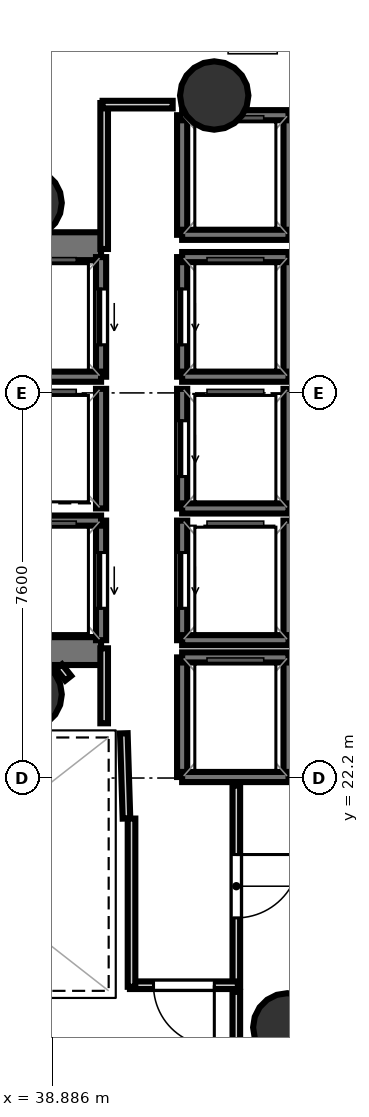
"""IFC4 building model, lengths in metres.
Left out: names, types, materials, properties, quantities, classifications, styles, units other than length and angle.
Written with IfcOpenShell. Run it as: python <this file> out.ifc"""

import sys

from ifc_helpers import new_model, si_unit, direction, frame, frame_2d, origin, origin_2d, place, context, subcontext, project, spatial, rectangle, hollow_circle, extrude, element, fill, save


model = new_model("IFC4")
c1 = context("Model", 3, precision=1e-05, world=origin(), true_north=direction((0.0, 1.0)))
c2 = subcontext(c1, "Body", "Model", "MODEL_VIEW")
j1 = project(units=[si_unit("LENGTHUNIT", "METRE"), si_unit("PLANEANGLEUNIT", "RADIAN")], contexts=[c1])
p1 = place(None, origin())
s1 = spatial("IfcSite", under=j1, at=p1, CompositionType="ELEMENT")
p2 = place(p1, origin())
s2 = spatial("IfcBuilding", under=s1, at=p2, CompositionType="ELEMENT")
p3 = place(p2, frame((0.0, 0.0, 158.7)))
s3 = spatial("IfcBuildingStorey", under=s2, at=p3, CompositionType="ELEMENT", Elevation=158.7)
p4 = place(p3, frame((29.23, 32.695, 0.0), z_axis=(0.0, 0.0, 1.0), x_axis=(1.0, 0.0, 0.0)))
e1 = element("IfcWall", 1, at=p4, inside=s3, PredefinedType="SHEAR", context=c2, shape_type="SweptSolid", body=[
    extrude(rectangle(XDim=10.62, YDim=0.55, at=frame_2d((5.31, 0.0))), origin(), (0.0, 0.0, 1.0), 3.52),
])
p5 = place(p4, frame((0.995, 0.0, 0.0)))
e2 = element("IfcOpeningElement", 2, at=p5, cuts=e1, PredefinedType="OPENING", context=c2, shape_type="SweptSolid", body=[
    extrude(rectangle(XDim=1.25, YDim=2.15, at=frame_2d((0.625, 1.075))), frame((0.0, 0.285, 0.0), z_axis=(0.0, -1.0, 0.0), x_axis=(1.0, 0.0, 0.0)), (0.0, 0.0, 1.0), 0.57),
])
p6 = place(p3, frame((29.23, 24.705, 0.0), z_axis=(0.0, 0.0, 1.0), x_axis=(1.0, 0.0, 0.0)))
e3 = element("IfcWall", 3, at=p6, inside=s3, PredefinedType="SHEAR", context=c2, shape_type="SweptSolid", body=[
    extrude(rectangle(XDim=10.62, YDim=0.55, at=frame_2d((5.31, 0.0))), origin(), (0.0, 0.0, 1.0), 3.52),
])
p7 = place(p6, frame((0.795, 0.0, 0.0)))
e4 = element("IfcOpeningElement", 4, at=p7, cuts=e3, PredefinedType="OPENING", context=c2, shape_type="SweptSolid", body=[
    extrude(rectangle(XDim=1.25, YDim=2.15, at=frame_2d((0.625, 1.075))), frame((0.0, 0.285, 0.0), z_axis=(0.0, -1.0, 0.0), x_axis=(1.0, 0.0, 0.0)), (0.0, 0.0, 1.0), 0.57),
])
for number, where, z_axis, x_axis in (
    (5, (38.4, 33.55, 0.0), (0.0, 0.0, 1.0), (1.0, 0.0, 0.0)),
    (6, (38.4, 23.85, 0.0), (0.0, 0.0, 1.0), (1.0, 0.0, 0.0)),
    (7, (42.083, 35.669, 0.0), (0.0, 0.0, 1.0), (1.0, 0.0, 0.0)),
    (8, (43.525, 17.279, 0.0), (0.0, 0.0, 1.0), (1.0, 0.0, 0.0)),
):
    element("IfcColumn", number, at=place(p3, frame(where, z_axis=z_axis, x_axis=x_axis)), inside=s3, PredefinedType="COLUMN", context=c2, shape_type="SweptSolid", body=[
        extrude(hollow_circle(Radius=0.675, WallThickness=0.032, at=origin_2d()), origin(), (0.0, 0.0, 1.0), 3.7),
    ])
p8 = place(p3, frame((39.85, 30.12, 0.0), z_axis=(0.0, 0.0, 1.0), x_axis=(0.0, 1.0, 0.0)))
e9 = element("IfcWall", 9, at=p8, inside=s3, PredefinedType="SOLIDWALL", context=c2, shape_type="SweptSolid", body=[
    extrude(rectangle(XDim=2.36, YDim=0.2, at=frame_2d((1.18, 0.0))), origin(), (0.0, 0.0, 1.0), 3.52),
])
p9 = place(p8, frame((0.63, 0.0, 0.0)))
e10 = element("IfcOpeningElement", 10, at=p9, cuts=e9, PredefinedType="OPENING", context=c2, shape_type="SweptSolid", body=[
    extrude(rectangle(XDim=1.1, YDim=2.15, at=frame_2d((0.55, 1.075))), frame((0.0, 0.11, 0.0), z_axis=(0.0, -1.0, 0.0), x_axis=(1.0, 0.0, 0.0)), (0.0, 0.0, 1.0), 0.22),
])
p10 = place(p3, frame((37.75, 30.12, 0.0), z_axis=(0.0, 0.0, 1.0), x_axis=(1.0, 0.0, 0.0)))
e11 = element("IfcWall", 11, at=p10, inside=s3, PredefinedType="SOLIDWALL", context=c2, shape_type="SweptSolid", body=[
    extrude(rectangle(XDim=2.1, YDim=0.2, at=frame_2d((1.05, 0.0))), origin(), (0.0, 0.0, 1.0), 3.52),
])
p11 = place(p3, frame((39.85, 24.92, 0.0), z_axis=(0.0, 0.0, 1.0), x_axis=(0.0, 1.0, 0.0)))
e12 = element("IfcWall", 12, at=p11, inside=s3, PredefinedType="SOLIDWALL", context=c2, shape_type="SweptSolid", body=[
    extrude(rectangle(XDim=2.36, YDim=0.2, at=frame_2d((1.18, 0.0))), origin(), (0.0, 0.0, 1.0), 3.52),
])
p12 = place(p11, frame((0.63, 0.0, 0.0)))
e13 = element("IfcOpeningElement", 13, at=p12, cuts=e12, PredefinedType="OPENING", context=c2, shape_type="SweptSolid", body=[
    extrude(rectangle(XDim=1.1, YDim=2.15, at=frame_2d((0.55, 1.075))), frame((0.0, 0.11, 0.0), z_axis=(0.0, -1.0, 0.0), x_axis=(1.0, 0.0, 0.0)), (0.0, 0.0, 1.0), 0.22),
])
p13 = place(p3, frame((37.75, 27.28, 0.0), z_axis=(0.0, 0.0, 1.0), x_axis=(1.0, 0.0, 0.0)))
e14 = element("IfcWall", 14, at=p13, inside=s3, PredefinedType="SOLIDWALL", context=c2, shape_type="SweptSolid", body=[
    extrude(rectangle(XDim=2.1, YDim=0.2, at=frame_2d((1.05, 0.0))), origin(), (0.0, 0.0, 1.0), 3.52),
])
p14 = place(p3, frame((43.55, 30.12, 0.0), z_axis=(0.0, 0.0, 1.0), x_axis=(0.0, 1.0, 0.0)))
e15 = element("IfcWall", 15, at=p14, inside=s3, PredefinedType="SOLIDWALL", context=c2, shape_type="SweptSolid", body=[
    extrude(rectangle(XDim=2.36, YDim=0.2, at=frame_2d((1.18, 0.0))), origin(), (0.0, 0.0, 1.0), 3.52),
])
p15 = place(p3, frame((41.45, 30.12, 0.0), z_axis=(0.0, 0.0, 1.0), x_axis=(0.0, 1.0, 0.0)))
e16 = element("IfcWall", 16, at=p15, inside=s3, PredefinedType="SOLIDWALL", context=c2, shape_type="SweptSolid", body=[
    extrude(rectangle(XDim=2.36, YDim=0.2, at=frame_2d((1.18, 0.0))), origin(), (0.0, 0.0, 1.0), 3.52),
])
p16 = place(p15, frame((0.63, 0.0, 0.0)))
e17 = element("IfcOpeningElement", 17, at=p16, cuts=e16, PredefinedType="OPENING", context=c2, shape_type="SweptSolid", body=[
    extrude(rectangle(XDim=1.1, YDim=2.15, at=frame_2d((0.55, 1.075))), frame((0.0, 0.11, 0.0), z_axis=(0.0, -1.0, 0.0), x_axis=(1.0, 0.0, 0.0)), (0.0, 0.0, 1.0), 0.22),
])
for number, where, z_axis, x_axis in (
    (18, (41.45, 32.48, 0.0), (0.0, 0.0, 1.0), (1.0, 0.0, 0.0)),
    (19, (41.45, 30.12, 0.0), (0.0, 0.0, 1.0), (1.0, 0.0, 0.0)),
):
    element("IfcWall", number, at=place(p3, frame(where, z_axis=z_axis, x_axis=x_axis)), inside=s3, PredefinedType="SOLIDWALL", context=c2, shape_type="SweptSolid", body=[
        extrude(rectangle(XDim=2.1, YDim=0.2, at=frame_2d((1.05, 0.0))), origin(), (0.0, 0.0, 1.0), 3.52),
    ])
p17 = place(p3, frame((43.55, 27.52, 0.0), z_axis=(0.0, 0.0, 1.0), x_axis=(0.0, 1.0, 0.0)))
e20 = element("IfcWall", 20, at=p17, inside=s3, PredefinedType="SOLIDWALL", context=c2, shape_type="SweptSolid", body=[
    extrude(rectangle(XDim=2.36, YDim=0.2, at=frame_2d((1.18, 0.0))), origin(), (0.0, 0.0, 1.0), 3.52),
])
p18 = place(p3, frame((41.45, 27.52, 0.0), z_axis=(0.0, 0.0, 1.0), x_axis=(0.0, 1.0, 0.0)))
e21 = element("IfcWall", 21, at=p18, inside=s3, PredefinedType="SOLIDWALL", context=c2, shape_type="SweptSolid", body=[
    extrude(rectangle(XDim=2.36, YDim=0.2, at=frame_2d((1.18, 0.0))), origin(), (0.0, 0.0, 1.0), 3.52),
])
p19 = place(p18, frame((0.63, 0.0, 0.0)))
e22 = element("IfcOpeningElement", 22, at=p19, cuts=e21, PredefinedType="OPENING", context=c2, shape_type="SweptSolid", body=[
    extrude(rectangle(XDim=1.1, YDim=2.15, at=frame_2d((0.55, 1.075))), frame((0.0, 0.11, 0.0), z_axis=(0.0, -1.0, 0.0), x_axis=(1.0, 0.0, 0.0)), (0.0, 0.0, 1.0), 0.22),
])
p20 = place(p3, frame((41.45, 27.52, 0.0), z_axis=(0.0, 0.0, 1.0), x_axis=(1.0, 0.0, 0.0)))
e23 = element("IfcWall", 23, at=p20, inside=s3, PredefinedType="SOLIDWALL", context=c2, shape_type="SweptSolid", body=[
    extrude(rectangle(XDim=2.1, YDim=0.2, at=frame_2d((1.05, 0.0))), origin(), (0.0, 0.0, 1.0), 3.52),
])
p21 = place(p3, frame((43.55, 24.92, 0.0), z_axis=(0.0, 0.0, 1.0), x_axis=(0.0, 1.0, 0.0)))
e24 = element("IfcWall", 24, at=p21, inside=s3, PredefinedType="SOLIDWALL", context=c2, shape_type="SweptSolid", body=[
    extrude(rectangle(XDim=2.36, YDim=0.2, at=frame_2d((1.18, 0.0))), origin(), (0.0, 0.0, 1.0), 3.52),
])
p22 = place(p3, frame((41.45, 24.92, 0.0), z_axis=(0.0, 0.0, 1.0), x_axis=(0.0, 1.0, 0.0)))
e25 = element("IfcWall", 25, at=p22, inside=s3, PredefinedType="SOLIDWALL", context=c2, shape_type="SweptSolid", body=[
    extrude(rectangle(XDim=2.36, YDim=0.2, at=frame_2d((1.18, 0.0))), origin(), (0.0, 0.0, 1.0), 3.52),
])
p23 = place(p22, frame((0.63, 0.0, 0.0)))
e26 = element("IfcOpeningElement", 26, at=p23, cuts=e25, PredefinedType="OPENING", context=c2, shape_type="SweptSolid", body=[
    extrude(rectangle(XDim=1.1, YDim=2.15, at=frame_2d((0.55, 1.075))), frame((0.0, 0.11, 0.0), z_axis=(0.0, -1.0, 0.0), x_axis=(1.0, 0.0, 0.0)), (0.0, 0.0, 1.0), 0.22),
])
p24 = place(p3, frame((41.45, 24.92, 0.0), z_axis=(0.0, 0.0, 1.0), x_axis=(1.0, 0.0, 0.0)))
e27 = element("IfcWall", 27, at=p24, inside=s3, PredefinedType="SOLIDWALL", context=c2, shape_type="SweptSolid", body=[
    extrude(rectangle(XDim=2.1, YDim=0.2, at=frame_2d((1.05, 0.0))), origin(), (0.0, 0.0, 1.0), 3.52),
])
p25 = place(p3, frame((39.85, 27.52, 0.0), z_axis=(0.0, 0.0, 1.0), x_axis=(0.0, 1.0, 0.0)))
e28 = element("IfcWall", 28, at=p25, inside=s3, PredefinedType="SOLIDWALL", context=c2, shape_type="SweptSolid", body=[
    extrude(rectangle(XDim=2.36, YDim=0.2, at=frame_2d((1.18, 0.0))), origin(), (0.0, 0.0, 1.0), 3.52),
])
for number, where, z_axis, x_axis in (
    (29, (43.55, 22.22, 0.0), (0.0, 0.0, 1.0), (0.0, 1.0, 0.0)),
    (30, (41.45, 22.22, 0.0), (0.0, 0.0, 1.0), (0.0, 1.0, 0.0)),
):
    element("IfcWall", number, at=place(p3, frame(where, z_axis=z_axis, x_axis=x_axis)), inside=s3, PredefinedType="SOLIDWALL", context=c2, shape_type="SweptSolid", body=[
        extrude(rectangle(XDim=2.36, YDim=0.2, at=frame_2d((1.18, 0.0))), origin(), (0.0, 0.0, 1.0), 3.52),
    ])
for number, where, z_axis, x_axis in (
    (31, (41.45, 24.58, 0.0), (0.0, 0.0, 1.0), (1.0, 0.0, 0.0)),
    (32, (41.45, 22.22, 0.0), (0.0, 0.0, 1.0), (1.0, 0.0, 0.0)),
):
    element("IfcWall", number, at=place(p3, frame(where, z_axis=z_axis, x_axis=x_axis)), inside=s3, PredefinedType="SOLIDWALL", context=c2, shape_type="SweptSolid", body=[
        extrude(rectangle(XDim=2.1, YDim=0.2, at=frame_2d((1.05, 0.0))), origin(), (0.0, 0.0, 1.0), 3.52),
    ])
for number, where, z_axis, x_axis in (
    (33, (43.55, 32.92, 0.0), (0.0, 0.0, 1.0), (0.0, 1.0, 0.0)),
    (34, (41.45, 32.92, 0.0), (0.0, 0.0, 1.0), (0.0, 1.0, 0.0)),
):
    element("IfcWall", number, at=place(p3, frame(where, z_axis=z_axis, x_axis=x_axis)), inside=s3, PredefinedType="SOLIDWALL", context=c2, shape_type="SweptSolid", body=[
        extrude(rectangle(XDim=2.36, YDim=0.2, at=frame_2d((1.18, 0.0))), origin(), (0.0, 0.0, 1.0), 3.52),
    ])
for number, where, z_axis, x_axis in (
    (35, (41.45, 35.28, 0.0), (0.0, 0.0, 1.0), (1.0, 0.0, 0.0)),
    (36, (41.45, 32.92, 0.0), (0.0, 0.0, 1.0), (1.0, 0.0, 0.0)),
):
    element("IfcWall", number, at=place(p3, frame(where, z_axis=z_axis, x_axis=x_axis)), inside=s3, PredefinedType="SOLIDWALL", context=c2, shape_type="SweptSolid", body=[
        extrude(rectangle(XDim=2.1, YDim=0.2, at=frame_2d((1.05, 0.0))), origin(), (0.0, 0.0, 1.0), 3.52),
    ])
p26 = place(p3, frame((40.351, 21.401, 0.0), z_axis=(0.0, 0.0, 1.0), x_axis=(-0.031058045979, 0.999517582527, 0.0)))
e37 = element("IfcWall", 37, at=p26, inside=s3, PredefinedType="PARTITIONING", context=c2, shape_type="SweptSolid", body=[
    extrude(rectangle(XDim=1.682, YDim=0.15, at=frame_2d((0.841, 0.0))), origin(), (0.0, 0.0, 1.0), 2.84),
])
p27 = place(p3, frame((39.911, 23.28, 0.0), z_axis=(0.0, 0.0, 1.0), x_axis=(0.0, 1.0, 0.0)))
e38 = element("IfcWall", 38, at=p27, inside=s3, PredefinedType="PARTITIONING", context=c2, shape_type="SweptSolid", body=[
    extrude(rectangle(XDim=1.48, YDim=0.15, at=frame_2d((0.74, 0.0))), origin(), (0.0, 0.0, 1.0), 2.84),
])
p28 = place(p3, frame((39.911, 32.64, 0.0), z_axis=(0.0, 0.0, 1.0), x_axis=(0.0, 1.0, 0.0)))
e39 = element("IfcWall", 39, at=p28, inside=s3, PredefinedType="PARTITIONING", context=c2, shape_type="SweptSolid", body=[
    extrude(rectangle(XDim=2.88, YDim=0.15, at=frame_2d((1.44, 0.0))), origin(), (0.0, 0.0, 1.0), 2.84),
])
p29 = place(p3, frame((39.88, 35.489, 0.0), z_axis=(0.0, 0.0, 1.0), x_axis=(1.0, 0.0, 0.0)))
e40 = element("IfcWall", 40, at=p29, inside=s3, PredefinedType="PARTITIONING", context=c2, shape_type="SweptSolid", body=[
    extrude(rectangle(XDim=1.383, YDim=0.15, at=frame_2d((0.691, 0.0))), origin(), (0.0, 0.0, 1.0), 2.84),
])
p30 = place(p3, frame((42.519, 22.05, 0.0), z_axis=(0.0, 0.0, 1.0), x_axis=(0.0, -1.0, 0.0)))
e41 = element("IfcWall", 41, at=p30, inside=s3, PredefinedType="PARTITIONING", context=c2, shape_type="SweptSolid", body=[
    extrude(rectangle(XDim=3.97, YDim=0.15, at=frame_2d((1.985, 0.0))), origin(), (0.0, 0.0, 1.0), 2.84),
])
p31 = place(p30, frame((1.36, 0.0, 0.0)))
e42 = element("IfcOpeningElement", 42, at=p31, cuts=e41, PredefinedType="OPENING", context=c2, shape_type="SweptSolid", body=[
    extrude(rectangle(XDim=1.25, YDim=2.2, at=frame_2d((0.625, 1.1))), frame((0.0, 0.085, 0.0), z_axis=(0.0, -1.0, 0.0), x_axis=(1.0, 0.0, 0.0)), (0.0, 0.0, 1.0), 0.17),
])
p32 = place(p3, frame((42.55, 18.111, 0.0), z_axis=(0.0, 0.0, 1.0), x_axis=(-1.0, 0.0, 0.0)))
e43 = element("IfcWall", 43, at=p32, inside=s3, PredefinedType="PARTITIONING", context=c2, shape_type="SweptSolid", body=[
    extrude(rectangle(XDim=2.13, YDim=0.15, at=frame_2d((1.065, 0.0))), origin(), (0.0, 0.0, 1.0), 2.84),
])
p33 = place(p32, frame((0.465, 0.0, 0.0)))
e44 = element("IfcOpeningElement", 44, at=p33, cuts=e43, PredefinedType="OPENING", context=c2, shape_type="SweptSolid", body=[
    extrude(rectangle(XDim=1.2, YDim=2.15, at=frame_2d((0.6, 1.075))), frame((0.0, 0.085, 0.0), z_axis=(0.0, -1.0, 0.0), x_axis=(1.0, 0.0, 0.0)), (0.0, 0.0, 1.0), 0.17),
])
p34 = place(p3, frame((40.451, 18.08, 0.0), z_axis=(0.0, 0.0, 1.0), x_axis=(0.0, 1.0, 0.0)))
e45 = element("IfcWall", 45, at=p34, inside=s3, PredefinedType="PARTITIONING", context=c2, shape_type="SweptSolid", body=[
    extrude(rectangle(XDim=3.32, YDim=0.15, at=frame_2d((1.66, 0.0))), origin(), (0.0, 0.0, 1.0), 2.84),
])
p35 = place(p3, frame((39.202, 24.169, 0.0), z_axis=(0.0, 0.0, 1.0), x_axis=(-0.622453876994, 0.782656483405, 0.0)))
e46 = element("IfcWall", 46, at=p35, inside=s3, PredefinedType="PARTITIONING", context=c2, shape_type="SweptSolid", body=[
    extrude(rectangle(XDim=0.292, YDim=0.15, at=frame_2d((0.146, 0.0))), origin(), (0.0, 0.0, 1.0), 2.84),
])
p36 = place(p3, frame((42.519, 17.98, 0.0), z_axis=(0.0, 0.0, 1.0), x_axis=(0.0, -1.0, 0.0)))
e47 = element("IfcWall", 47, at=p36, inside=s3, PredefinedType="PARTITIONING", context=c2, shape_type="SweptSolid", body=[
    extrude(rectangle(XDim=3.201, YDim=0.15, at=frame_2d((1.601, 0.0))), origin(), (0.0, 0.0, 1.0), 2.84),
])
p37 = place(p9, origin())
e48 = element("IfcDoor", 48, at=p37, inside=s3, OperationType="SLIDING_TO_LEFT", PredefinedType="DOOR", context=c2, shape_type="SweptSolid", body=[
    extrude(rectangle(XDim=1.1, YDim=2.15, at=frame_2d((0.55, 1.075))), frame((0.0, 0.025, 0.0), z_axis=(0.0, -1.0, 0.0), x_axis=(1.0, 0.0, 0.0)), (0.0, 0.0, 1.0), 0.05),
])
fill(e10, e48)
p38 = place(p12, origin())
e49 = element("IfcDoor", 49, at=p38, inside=s3, OperationType="SLIDING_TO_LEFT", PredefinedType="DOOR", context=c2, shape_type="SweptSolid", body=[
    extrude(rectangle(XDim=1.1, YDim=2.15, at=frame_2d((0.55, 1.075))), frame((0.0, 0.025, 0.0), z_axis=(0.0, -1.0, 0.0), x_axis=(1.0, 0.0, 0.0)), (0.0, 0.0, 1.0), 0.05),
])
fill(e13, e49)
p39 = place(p16, origin())
e50 = element("IfcDoor", 50, at=p39, inside=s3, OperationType="SLIDING_TO_LEFT", PredefinedType="DOOR", context=c2, shape_type="SweptSolid", body=[
    extrude(rectangle(XDim=1.1, YDim=2.15, at=frame_2d((0.55, 1.075))), frame((0.0, 0.025, 0.0), z_axis=(0.0, -1.0, 0.0), x_axis=(1.0, 0.0, 0.0)), (0.0, 0.0, 1.0), 0.05),
])
fill(e17, e50)
p40 = place(p19, origin())
e51 = element("IfcDoor", 51, at=p40, inside=s3, OperationType="SLIDING_TO_LEFT", PredefinedType="DOOR", context=c2, shape_type="SweptSolid", body=[
    extrude(rectangle(XDim=1.1, YDim=2.15, at=frame_2d((0.55, 1.075))), frame((0.0, 0.025, 0.0), z_axis=(0.0, -1.0, 0.0), x_axis=(1.0, 0.0, 0.0)), (0.0, 0.0, 1.0), 0.05),
])
fill(e22, e51)
p41 = place(p23, origin())
e52 = element("IfcDoor", 52, at=p41, inside=s3, OperationType="SLIDING_TO_LEFT", PredefinedType="DOOR", context=c2, shape_type="SweptSolid", body=[
    extrude(rectangle(XDim=1.1, YDim=2.15, at=frame_2d((0.55, 1.075))), frame((0.0, 0.025, 0.0), z_axis=(0.0, -1.0, 0.0), x_axis=(1.0, 0.0, 0.0)), (0.0, 0.0, 1.0), 0.05),
])
fill(e26, e52)
p42 = place(p33, origin())
e53 = element("IfcDoor", 53, at=p42, inside=s3, OperationType="SINGLE_SWING_LEFT", PredefinedType="DOOR", context=c2, shape_type="SweptSolid", body=[
    extrude(rectangle(XDim=1.2, YDim=2.15, at=frame_2d((0.6, 1.075))), frame((0.0, 0.025, 0.0), z_axis=(0.0, -1.0, 0.0), x_axis=(1.0, 0.0, 0.0)), (0.0, 0.0, 1.0), 0.05),
])
fill(e44, e53)
p43 = place(p31, origin())
e54 = element("IfcDoor", 54, at=p43, inside=s3, OperationType="SINGLE_SWING_LEFT", PredefinedType="DOOR", context=c2, shape_type="SweptSolid", body=[
    extrude(rectangle(XDim=1.25, YDim=2.2, at=frame_2d((0.625, 1.1))), frame((0.0, 0.025, 0.0), z_axis=(0.0, -1.0, 0.0), x_axis=(1.0, 0.0, 0.0)), (0.0, 0.0, 1.0), 0.05),
])
fill(e42, e54)
save(model, sys.argv[1])
